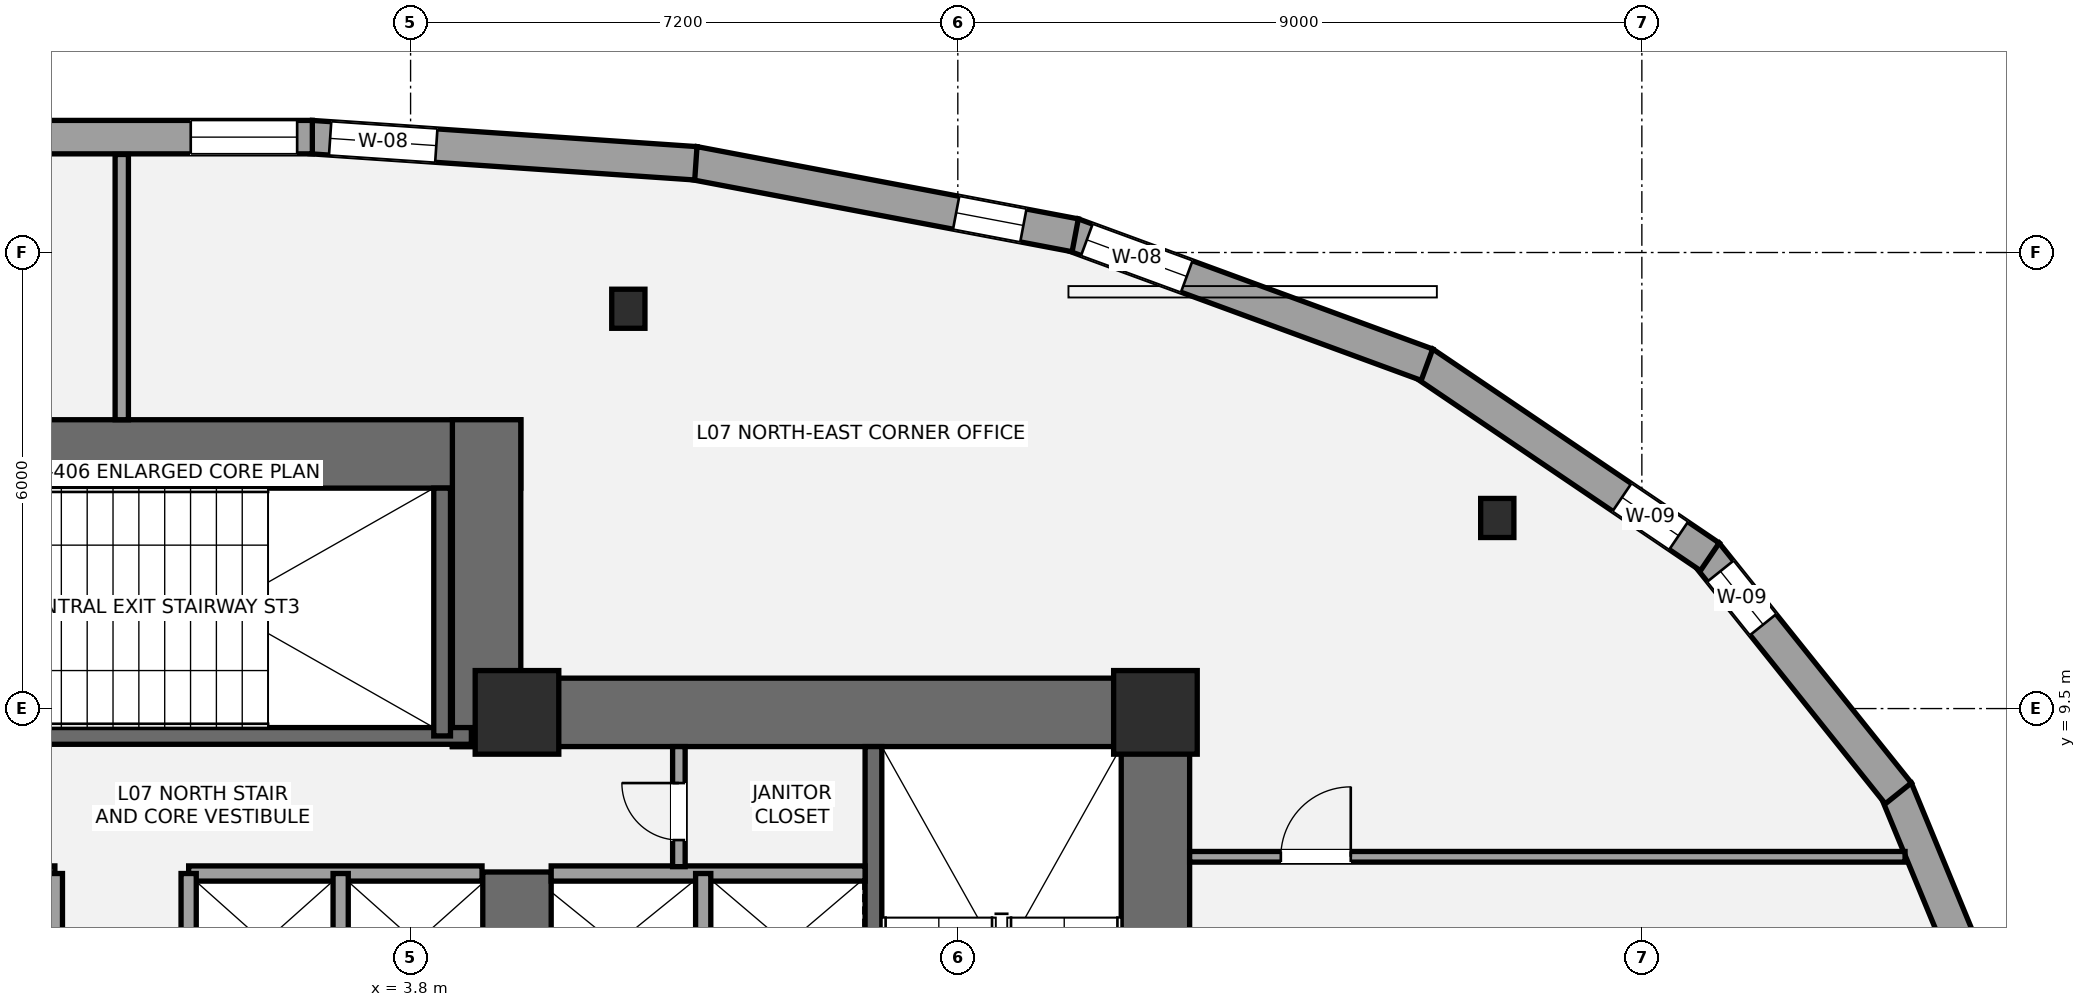
"""IFC4 building model, lengths in metres.
Left out: names, types, materials, properties, quantities, classifications, styles, units other than length and angle.
Written with IfcOpenShell. Run it as: python <this file> out.ifc"""

import sys

from ifc_helpers import new_model, si_unit, direction, frame, frame_2d, origin, origin_2d, place, context, subcontext, project, spatial, rectangle, i_section, extrude, element, fill, save


model = new_model("IFC4")
c1 = context("Model", 3, precision=1e-05, world=origin(), true_north=direction((0.0, 1.0)))
c2 = subcontext(c1, "Body", "Model", "MODEL_VIEW")
j1 = project(units=[si_unit("LENGTHUNIT", "METRE"), si_unit("PLANEANGLEUNIT", "RADIAN")], contexts=[c1])
p1 = place(None, origin())
s1 = spatial("IfcSite", under=j1, at=p1, CompositionType="ELEMENT")
p2 = place(p1, origin())
s2 = spatial("IfcBuilding", under=s1, at=p2, CompositionType="ELEMENT")
p3 = place(p2, frame((0.0, 0.0, 30.6)))
s3 = spatial("IfcBuildingStorey", under=s2, at=p3, CompositionType="ELEMENT", Elevation=30.6)
p4 = place(p3, frame((13.6, 0.95, 0.0), z_axis=(0.0, 0.0, 1.0), x_axis=(0.0, 1.0, 0.0)))
e1 = element("IfcWall", 1, at=p4, inside=s3, PredefinedType="SHEAR", context=c2, shape_type="SweptSolid", body=[
    extrude(rectangle(XDim=8.95, YDim=0.9, at=frame_2d((4.475, 0.0))), origin(), (0.0, 0.0, 1.0), 3.6),
])
p5 = place(p3, frame((4.35, 9.45, 0.0), z_axis=(0.0, 0.0, 1.0), x_axis=(1.0, 0.0, 0.0)))
e2 = element("IfcWall", 2, at=p5, inside=s3, PredefinedType="SHEAR", context=c2, shape_type="SweptSolid", body=[
    extrude(rectangle(XDim=9.7, YDim=0.9, at=frame_2d((4.85, 0.0))), origin(), (0.0, 0.0, 1.0), 3.6),
])
p6 = place(p3, frame((5.2, 5.35, 0.0), z_axis=(0.0, 0.0, 1.0), x_axis=(0.0, 1.0, 0.0)))
e3 = element("IfcWall", 3, at=p6, inside=s3, PredefinedType="SHEAR", context=c2, shape_type="SweptSolid", body=[
    extrude(rectangle(XDim=2.0, YDim=0.9, at=frame_2d((1.0, 0.0))), origin(), (0.0, 0.0, 1.0), 3.6),
])
p7 = place(p3, frame((9.89, 1.85, 0.0), z_axis=(0.0, 0.0, 1.0), x_axis=(0.0, 1.0, 0.0)))
e4 = element("IfcWall", 4, at=p7, inside=s3, PredefinedType="SHEAR", context=c2, shape_type="SweptSolid", body=[
    extrude(rectangle(XDim=7.15, YDim=0.22, at=frame_2d((3.575, 0.0))), origin(), (0.0, 0.0, 1.0), 3.6),
])
p8 = place(p3, frame((-5.25, 12.85, 0.0), z_axis=(0.0, 0.0, 1.0), x_axis=(1.0, 0.0, 0.0)))
e5 = element("IfcWall", 5, at=p8, inside=s3, PredefinedType="SHEAR", context=c2, shape_type="SweptSolid", body=[
    extrude(rectangle(XDim=10.5, YDim=0.9, at=frame_2d((5.25, 0.0))), origin(), (0.0, 0.0, 1.0), 3.6),
])
p9 = place(p3, frame((4.8, 9.0, 0.0), z_axis=(0.0, 0.0, 1.0), x_axis=(0.0, 1.0, 0.0)))
e6 = element("IfcWall", 6, at=p9, inside=s3, PredefinedType="SHEAR", context=c2, shape_type="SweptSolid", body=[
    extrude(rectangle(XDim=4.3, YDim=0.9, at=frame_2d((2.15, 0.0))), origin(), (0.0, 0.0, 1.0), 3.6),
])
p10 = place(p3, frame((-4.7, 9.14, 0.0), z_axis=(0.0, 0.0, 1.0), x_axis=(1.0, 0.0, 0.0)))
e7 = element("IfcWall", 7, at=p10, inside=s3, PredefinedType="SHEAR", context=c2, shape_type="SweptSolid", body=[
    extrude(rectangle(XDim=9.3, YDim=0.22, at=frame_2d((4.65, 0.0))), origin(), (0.0, 0.0, 1.0), 3.6),
])
p11 = place(p10, frame((1.15, 0.0, 0.0)))
e8 = element("IfcOpeningElement", 8, at=p11, cuts=e7, PredefinedType="OPENING", context=c2, shape_type="SweptSolid", body=[
    extrude(rectangle(XDim=1.05, YDim=2.15, at=frame_2d((0.525, 1.075))), frame((0.0, 0.12, 0.0), z_axis=(0.0, -1.0, 0.0), x_axis=(1.0, 0.0, 0.0)), (0.0, 0.0, 1.0), 0.24),
])
p12 = place(p3, frame((4.215, 9.14, 0.0), z_axis=(0.0, 0.0, 1.0), x_axis=(0.0, 1.0, 0.0)))
e9 = element("IfcWall", 9, at=p12, inside=s3, PredefinedType="SHEAR", context=c2, shape_type="SweptSolid", body=[
    extrude(rectangle(XDim=3.26, YDim=0.22, at=frame_2d((1.63, 0.0))), origin(), (0.0, 0.0, 1.0), 3.6),
])
for number, where, z_axis, x_axis in (
    (10, (5.2, 9.45, 0.0), (0.0, 0.0, 1.0), (1.0, 0.0, 0.0)),
    (11, (13.6, 9.45, 0.0), (0.0, 0.0, 1.0), (1.0, 0.0, 0.0)),
):
    element("IfcColumn", number, at=place(p3, frame(where, z_axis=z_axis, x_axis=x_axis)), inside=s3, PredefinedType="COLUMN", context=c2, shape_type="SweptSolid", body=[
        extrude(rectangle(XDim=1.1, YDim=1.1, at=origin_2d()), origin(), (0.0, 0.0, 1.0), 3.6),
    ])
for number, where, z_axis, x_axis in (
    (12, (18.098, 12.007, 0.0), (0.0, 0.0, 1.0), (1.0, 0.0, 0.0)),
    (13, (6.665, 14.76, 0.0), (0.0, 0.0, 1.0), (1.0, 0.0, 0.0)),
):
    element("IfcColumn", number, at=place(p3, frame(where, z_axis=z_axis, x_axis=x_axis)), inside=s3, PredefinedType="COLUMN", context=c2, shape_type="SweptSolid", body=[
        extrude(i_section(OverallWidth=0.437, OverallDepth=0.514, WebThickness=0.061, FlangeThickness=0.097, at=origin_2d()), origin(), (0.0, 0.0, 1.0), 3.6),
    ])
p13 = place(p3, frame((23.343, 8.438, 0.0), z_axis=(0.0, 0.0, 1.0), x_axis=(0.381925438614, -0.92419313963, 0.0)))
e14 = element("IfcWall", 14, at=p13, inside=s3, PredefinedType="STANDARD", context=c2, shape_type="SweptSolid", body=[
    extrude(rectangle(XDim=3.676, YDim=0.44, at=frame_2d((1.838, 0.0))), origin(), (0.0, 0.0, 1.0), 2.533),
])
p14 = place(p3, frame((20.846, 11.541, 0.0), z_axis=(0.0, 0.0, 1.0), x_axis=(0.625180729177, -0.780480016314, 0.0)))
e15 = element("IfcWall", 15, at=p14, inside=s3, PredefinedType="STANDARD", context=c2, shape_type="SweptSolid", body=[
    extrude(rectangle(XDim=4.045, YDim=0.44, at=frame_2d((2.022, 0.0))), origin(), (0.0, 0.0, 1.0), 2.533),
])
p15 = place(p14, frame((0.3, 0.0, 0.58)))
e16 = element("IfcOpeningElement", 16, at=p15, cuts=e15, PredefinedType="OPENING", context=c2, shape_type="SweptSolid", body=[
    extrude(rectangle(XDim=0.9, YDim=1.35, at=frame_2d((0.45, 0.675))), frame((0.0, 0.23, 0.0), z_axis=(0.0, -1.0, 0.0), x_axis=(1.0, 0.0, 0.0)), (0.0, 0.0, 1.0), 0.46),
])
p16 = place(p3, frame((17.125, 14.048, 0.0), z_axis=(0.0, 0.0, 1.0), x_axis=(0.828051238664, -0.560652429003, 0.0)))
e17 = element("IfcWall", 17, at=p16, inside=s3, PredefinedType="STANDARD", context=c2, shape_type="SweptSolid", body=[
    extrude(rectangle(XDim=4.552, YDim=0.44, at=frame_2d((2.276, 0.0))), origin(), (0.0, 0.0, 1.0), 2.533),
])
p17 = place(p16, frame((3.156, 0.0, 0.58)))
e18 = element("IfcOpeningElement", 18, at=p17, cuts=e17, PredefinedType="OPENING", context=c2, shape_type="SweptSolid", body=[
    extrude(rectangle(XDim=0.9, YDim=1.35, at=frame_2d((0.45, 0.675))), frame((0.0, 0.23, 0.0), z_axis=(0.0, -1.0, 0.0), x_axis=(1.0, 0.0, 0.0)), (0.0, 0.0, 1.0), 0.46),
])
p18 = place(p3, frame((12.51, 15.736, 0.0), z_axis=(0.0, 0.0, 1.0), x_axis=(0.938710986641, -0.344705212552, 0.0)))
e19 = element("IfcWall", 19, at=p18, inside=s3, PredefinedType="STANDARD", context=c2, shape_type="SweptSolid", body=[
    extrude(rectangle(XDim=4.967, YDim=0.44, at=frame_2d((2.483, 0.0))), origin(), (0.0, 0.0, 1.0), 2.529),
])
p19 = place(p18, frame((0.2, 0.0, 0.45)))
e20 = element("IfcOpeningElement", 20, at=p19, cuts=e19, PredefinedType="OPENING", context=c2, shape_type="SweptSolid", body=[
    extrude(rectangle(XDim=1.4, YDim=1.55, at=frame_2d((0.7, 0.775))), frame((0.0, 0.23, 0.0), z_axis=(0.0, -1.0, 0.0), x_axis=(1.0, 0.0, 0.0)), (0.0, 0.0, 1.0), 0.46),
])
p20 = place(p3, frame((7.528, 16.677, 0.0), z_axis=(0.0, 0.0, 1.0), x_axis=(0.982516391845, -0.186176098776, 0.0)))
e21 = element("IfcWall", 21, at=p20, inside=s3, PredefinedType="STANDARD", context=c2, shape_type="SweptSolid", body=[
    extrude(rectangle(XDim=5.106, YDim=0.44, at=frame_2d((2.553, 0.0))), origin(), (0.0, 0.0, 1.0), 2.533),
])
p21 = place(p20, frame((3.512, 0.0, 0.58)))
e22 = element("IfcOpeningElement", 22, at=p21, cuts=e21, PredefinedType="OPENING", context=c2, shape_type="SweptSolid", body=[
    extrude(rectangle(XDim=0.9, YDim=1.35, at=frame_2d((0.45, 0.675))), frame((0.0, 0.23, 0.0), z_axis=(0.0, -1.0, 0.0), x_axis=(1.0, 0.0, 0.0)), (0.0, 0.0, 1.0), 0.46),
])
p22 = place(p3, frame((2.492, 17.018, 0.0), z_axis=(0.0, 0.0, 1.0), x_axis=(0.997688292846, -0.067956385408, 0.0)))
e23 = element("IfcWall", 23, at=p22, inside=s3, PredefinedType="STANDARD", context=c2, shape_type="SweptSolid", body=[
    extrude(rectangle(XDim=5.073, YDim=0.44, at=frame_2d((2.536, 0.0))), origin(), (0.0, 0.0, 1.0), 2.533),
])
p23 = place(p22, frame((0.25, 0.0, 0.45)))
e24 = element("IfcOpeningElement", 24, at=p23, cuts=e23, PredefinedType="OPENING", context=c2, shape_type="SweptSolid", body=[
    extrude(rectangle(XDim=1.4, YDim=1.55, at=frame_2d((0.7, 0.775))), frame((0.0, 0.23, 0.0), z_axis=(0.0, -1.0, 0.0), x_axis=(1.0, 0.0, 0.0)), (0.0, 0.0, 1.0), 0.46),
])
p24 = place(p3, frame((-2.508, 17.018, 0.0), z_axis=(0.0, 0.0, 1.0), x_axis=(1.0, 0.0, 0.0)))
e25 = element("IfcWall", 25, at=p24, inside=s3, PredefinedType="STANDARD", context=c2, shape_type="SweptSolid", body=[
    extrude(rectangle(XDim=5.015, YDim=0.44, at=frame_2d((2.508, 0.0))), origin(), (0.0, 0.0, 1.0), 2.533),
])
p25 = place(p24, frame((3.415, 0.0, 0.45)))
e26 = element("IfcOpeningElement", 26, at=p25, cuts=e25, PredefinedType="OPENING", context=c2, shape_type="SweptSolid", body=[
    extrude(rectangle(XDim=1.4, YDim=1.55, at=frame_2d((0.7, 0.775))), frame((0.0, 0.23, 0.0), z_axis=(0.0, -1.0, 0.0), x_axis=(1.0, 0.0, 0.0)), (0.0, 0.0, 1.0), 0.46),
])
p26 = place(p3, frame((5.65, 7.33, 0.0), z_axis=(0.0, 0.0, 1.0), x_axis=(1.0, 0.0, 0.0)))
e27 = element("IfcWall", 27, at=p26, inside=s3, PredefinedType="SOLIDWALL", context=c2, shape_type="SweptSolid", body=[
    extrude(rectangle(XDim=4.13, YDim=0.2, at=frame_2d((2.065, 0.0))), origin(), (0.0, 0.0, 1.0), 3.4),
])
p27 = place(p3, frame((7.65, 5.47, 0.0), z_axis=(0.0, 0.0, 1.0), x_axis=(0.0, 1.0, 0.0)))
e28 = element("IfcWall", 28, at=p27, inside=s3, PredefinedType="SOLIDWALL", context=c2, shape_type="SweptSolid", body=[
    extrude(rectangle(XDim=1.86, YDim=0.2, at=frame_2d((0.93, 0.0))), origin(), (0.0, 0.0, 1.0), 3.4),
])
for number, where, z_axis, x_axis in (
    (29, (-4.74, 7.33, 0.0), (0.0, 0.0, 1.0), (1.0, 0.0, 0.0)),
    (30, (0.88, 7.33, 0.0), (0.0, 0.0, 1.0), (1.0, 0.0, 0.0)),
):
    element("IfcWall", number, at=place(p3, frame(where, z_axis=z_axis, x_axis=x_axis)), inside=s3, PredefinedType="SOLIDWALL", context=c2, shape_type="SweptSolid", body=[
        extrude(rectangle(XDim=3.86, YDim=0.2, at=frame_2d((1.93, 0.0))), origin(), (0.0, 0.0, 1.0), 3.4),
    ])
for number, where, z_axis, x_axis in (
    (31, (2.88, 5.52, 0.0), (0.0, 0.0, 1.0), (0.0, 1.0, 0.0)),
    (32, (-0.88, 5.52, 0.0), (0.0, 0.0, 1.0), (0.0, 1.0, 0.0)),
    (33, (0.88, 5.52, 0.0), (0.0, 0.0, 1.0), (0.0, 1.0, 0.0)),
):
    element("IfcWall", number, at=place(p3, frame(where, z_axis=z_axis, x_axis=x_axis)), inside=s3, PredefinedType="SOLIDWALL", context=c2, shape_type="SweptSolid", body=[
        extrude(rectangle(XDim=1.81, YDim=0.2, at=frame_2d((0.905, 0.0))), origin(), (0.0, 0.0, 1.0), 3.4),
    ])
p28 = place(p3, frame((7.33, 7.42, 0.0), z_axis=(0.0, 0.0, 1.0), x_axis=(0.0, 1.0, 0.0)))
e34 = element("IfcWall", 34, at=p28, inside=s3, PredefinedType="PARTITIONING", context=c2, shape_type="SweptSolid", body=[
    extrude(rectangle(XDim=1.58, YDim=0.165, at=frame_2d((0.79, 0.0))), origin(), (0.0, 0.0, 1.0), 3.4),
])
p29 = place(p28, frame((0.35, 0.0, 0.0)))
e35 = element("IfcOpeningElement", 35, at=p29, cuts=e34, PredefinedType="OPENING", context=c2, shape_type="SweptSolid", body=[
    extrude(rectangle(XDim=0.75, YDim=2.1, at=frame_2d((0.375, 1.05))), frame((0.0, 0.093, 0.0), z_axis=(0.0, -1.0, 0.0), x_axis=(1.0, 0.0, 0.0)), (0.0, 0.0, 1.0), 0.185),
])
p30 = place(p3, frame((14.05, 7.55, 0.0), z_axis=(0.0, 0.0, 1.0), x_axis=(1.0, 0.0, 0.0)))
e36 = element("IfcWall", 36, at=p30, inside=s3, PredefinedType="PARTITIONING", context=c2, shape_type="SweptSolid", body=[
    extrude(rectangle(XDim=9.413, YDim=0.14, at=frame_2d((4.707, 0.0))), origin(), (0.0, 0.0, 1.0), 3.4),
])
p31 = place(p30, frame((1.2, 0.0, 0.0)))
e37 = element("IfcOpeningElement", 37, at=p31, cuts=e36, PredefinedType="OPENING", context=c2, shape_type="SweptSolid", body=[
    extrude(rectangle(XDim=0.92, YDim=2.15, at=frame_2d((0.46, 1.075))), frame((0.0, 0.08, 0.0), z_axis=(0.0, -1.0, 0.0), x_axis=(1.0, 0.0, 0.0)), (0.0, 0.0, 1.0), 0.16),
])
p32 = place(p3, frame((0.0, 13.3, 0.0), z_axis=(0.0, 0.0, 1.0), x_axis=(0.0, 1.0, 0.0)))
e38 = element("IfcWall", 38, at=p32, inside=s3, PredefinedType="PARTITIONING", context=c2, shape_type="SweptSolid", body=[
    extrude(rectangle(XDim=3.49, YDim=0.175, at=frame_2d((1.745, 0.0))), origin(), (0.0, 0.0, 1.0), 3.4),
])
p33 = place(p15, origin())
e39 = element("IfcWindow", 39, at=p33, inside=s3, PartitioningType="SINGLE_PANEL", PredefinedType="WINDOW", context=c2, shape_type="SweptSolid", body=[
    extrude(rectangle(XDim=0.9, YDim=1.35, at=frame_2d((0.45, 0.675))), frame((0.0, -0.01, 0.0), z_axis=(0.0, -1.0, 0.0), x_axis=(1.0, 0.0, 0.0)), (0.0, 0.0, 1.0), 0.06),
])
fill(e16, e39)
p34 = place(p17, origin())
e40 = element("IfcWindow", 40, at=p34, inside=s3, PartitioningType="SINGLE_PANEL", PredefinedType="WINDOW", context=c2, shape_type="SweptSolid", body=[
    extrude(rectangle(XDim=0.9, YDim=1.35, at=frame_2d((0.45, 0.675))), frame((0.0, -0.01, 0.0), z_axis=(0.0, -1.0, 0.0), x_axis=(1.0, 0.0, 0.0)), (0.0, 0.0, 1.0), 0.06),
])
fill(e18, e40)
p35 = place(p19, origin())
e41 = element("IfcWindow", 41, at=p35, inside=s3, PartitioningType="SINGLE_PANEL", PredefinedType="WINDOW", context=c2, shape_type="SweptSolid", body=[
    extrude(rectangle(XDim=1.4, YDim=1.55, at=frame_2d((0.7, 0.775))), frame((0.0, -0.01, 0.0), z_axis=(0.0, -1.0, 0.0), x_axis=(1.0, 0.0, 0.0)), (0.0, 0.0, 1.0), 0.06),
])
fill(e20, e41)
p36 = place(p21, origin())
e42 = element("IfcWindow", 42, at=p36, inside=s3, PartitioningType="SINGLE_PANEL", PredefinedType="WINDOW", context=c2, shape_type="SweptSolid", body=[
    extrude(rectangle(XDim=0.9, YDim=1.35, at=frame_2d((0.45, 0.675))), frame((0.0, -0.01, 0.0), z_axis=(0.0, -1.0, 0.0), x_axis=(1.0, 0.0, 0.0)), (0.0, 0.0, 1.0), 0.06),
])
fill(e22, e42)
p37 = place(p23, origin())
e43 = element("IfcWindow", 43, at=p37, inside=s3, PartitioningType="SINGLE_PANEL", PredefinedType="WINDOW", context=c2, shape_type="SweptSolid", body=[
    extrude(rectangle(XDim=1.4, YDim=1.55, at=frame_2d((0.7, 0.775))), frame((0.0, -0.01, 0.0), z_axis=(0.0, -1.0, 0.0), x_axis=(1.0, 0.0, 0.0)), (0.0, 0.0, 1.0), 0.06),
])
fill(e24, e43)
p38 = place(p25, origin())
e44 = element("IfcWindow", 44, at=p38, inside=s3, PartitioningType="SINGLE_PANEL", PredefinedType="WINDOW", context=c2, shape_type="SweptSolid", body=[
    extrude(rectangle(XDim=1.4, YDim=1.55, at=frame_2d((0.7, 0.775))), frame((0.0, -0.01, 0.0), z_axis=(0.0, -1.0, 0.0), x_axis=(1.0, 0.0, 0.0)), (0.0, 0.0, 1.0), 0.06),
])
fill(e26, e44)
p39 = place(p29, origin())
e45 = element("IfcDoor", 45, at=p39, inside=s3, OperationType="SINGLE_SWING_RIGHT", PredefinedType="DOOR", context=c2, shape_type="SweptSolid", body=[
    extrude(rectangle(XDim=0.75, YDim=2.1, at=frame_2d((0.375, 1.05))), frame((0.0, 0.025, 0.0), z_axis=(0.0, -1.0, 0.0), x_axis=(1.0, 0.0, 0.0)), (0.0, 0.0, 1.0), 0.05),
])
fill(e35, e45)
p40 = place(p31, origin())
e46 = element("IfcDoor", 46, at=p40, inside=s3, OperationType="SINGLE_SWING_RIGHT", PredefinedType="DOOR", context=c2, shape_type="SweptSolid", body=[
    extrude(rectangle(XDim=0.92, YDim=2.15, at=frame_2d((0.46, 1.075))), frame((0.0, 0.025, 0.0), z_axis=(0.0, -1.0, 0.0), x_axis=(1.0, 0.0, 0.0)), (0.0, 0.0, 1.0), 0.05),
])
fill(e37, e46)
save(model, sys.argv[1])
